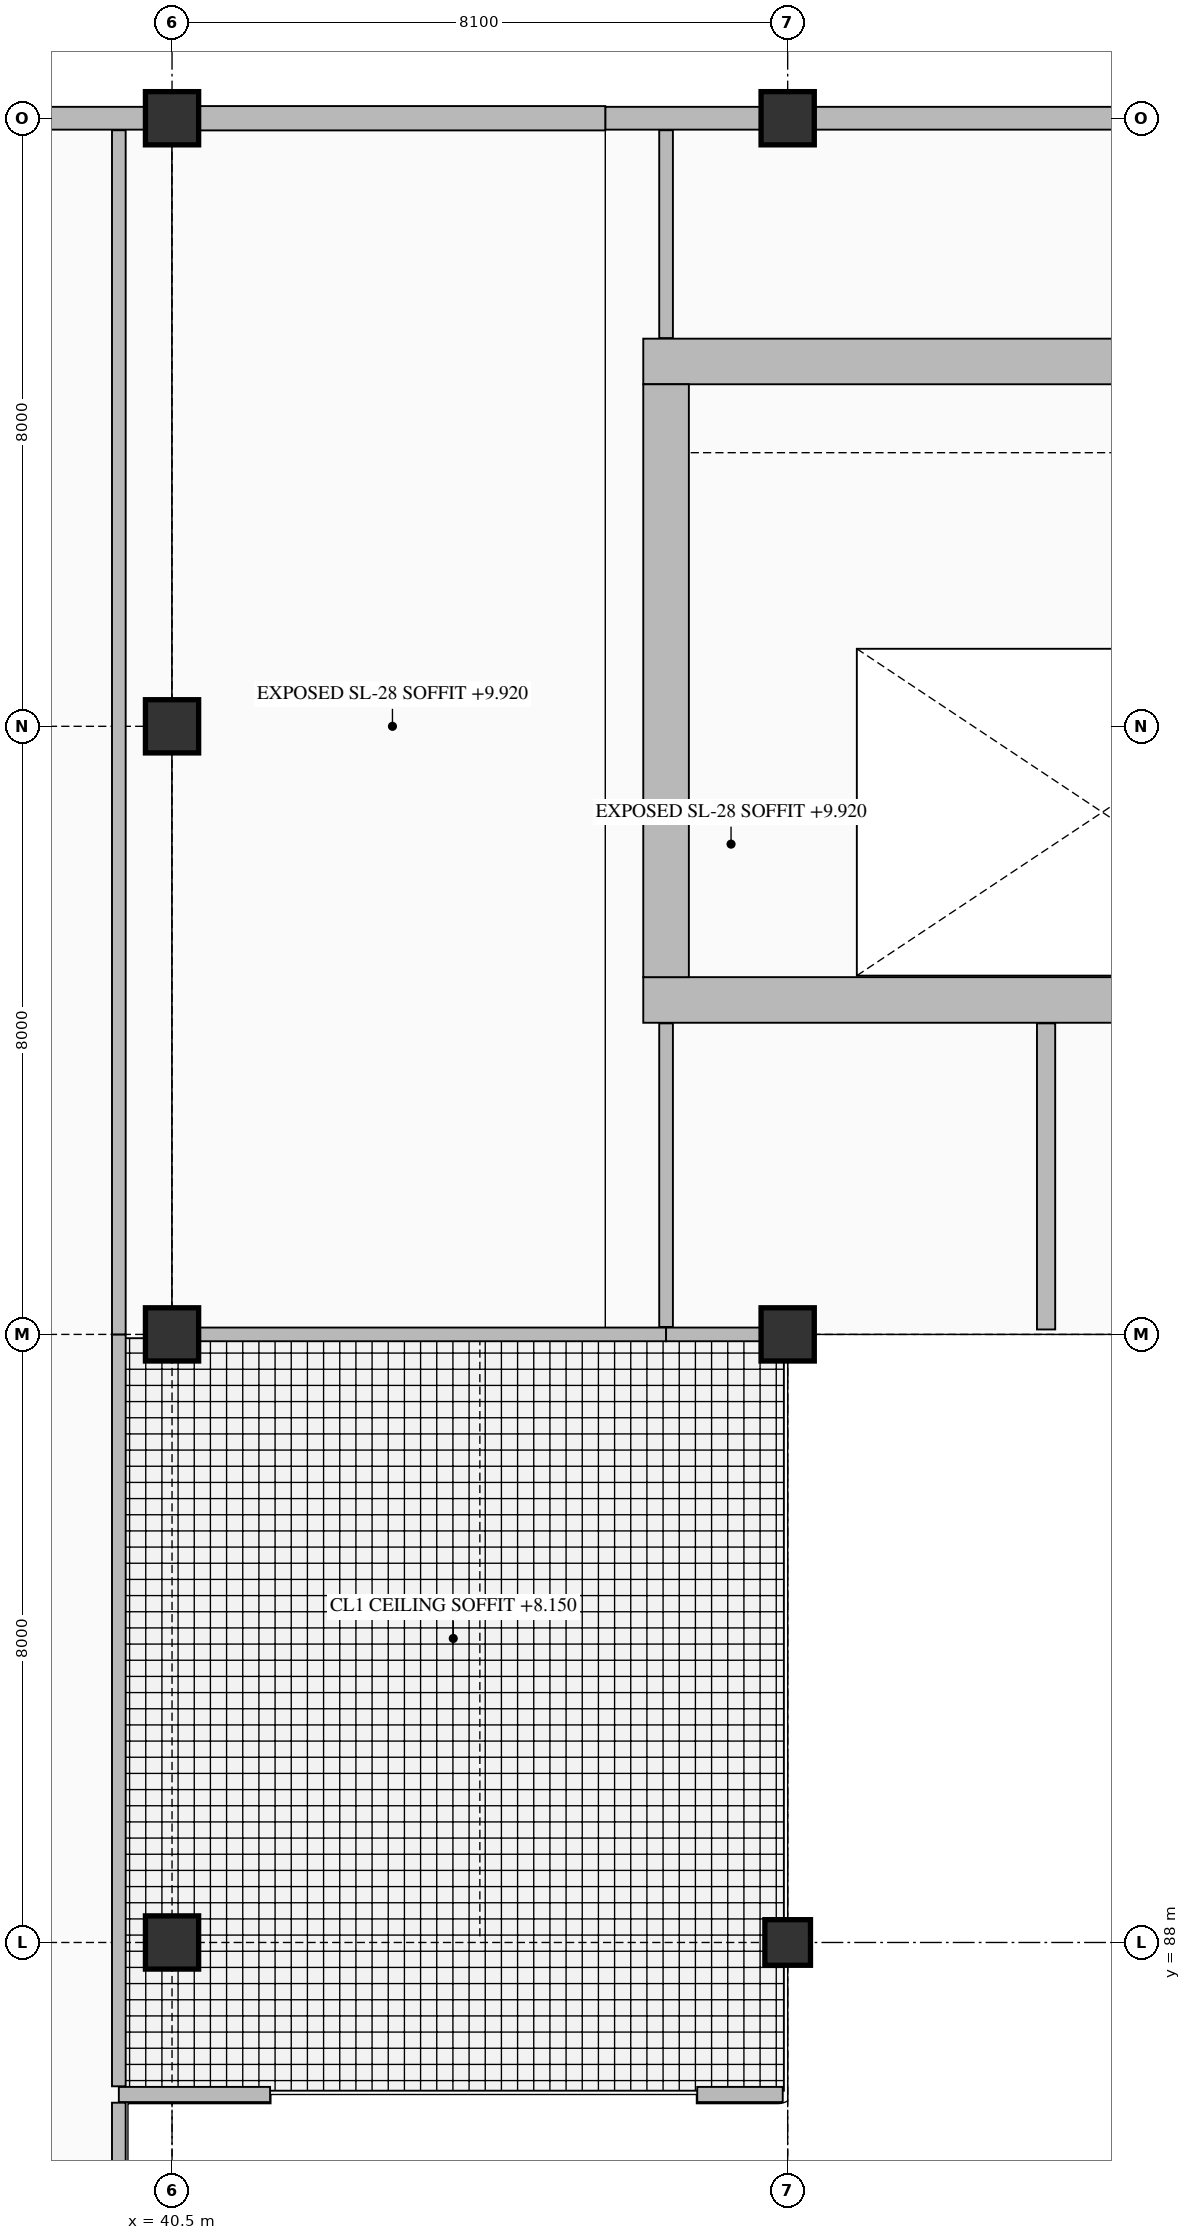
"""IFC4 building model, lengths in metres.
Left out: names, types, materials, properties, quantities, classifications, styles, units other than length and angle.
Written with IfcOpenShell. Run it as: python <this file> out.ifc"""

import sys

from ifc_helpers import new_model, si_unit, direction, frame, frame_2d, origin, origin_2d, place, context, subcontext, project, spatial, rectangle, extrude, element, fill, save


model = new_model("IFC4")
c1 = context("Model", 3, precision=1e-05, world=origin(), true_north=direction((0.0, 1.0)))
c2 = subcontext(c1, "Body", "Model", "MODEL_VIEW")
j1 = project(units=[si_unit("LENGTHUNIT", "METRE"), si_unit("PLANEANGLEUNIT", "RADIAN")], contexts=[c1])
p1 = place(None, origin())
s1 = spatial("IfcSite", under=j1, at=p1, CompositionType="ELEMENT")
p2 = place(p1, origin())
s2 = spatial("IfcBuilding", under=s1, at=p2, CompositionType="ELEMENT")
p3 = place(p2, frame((0.0, 0.0, 5.4)))
s3 = spatial("IfcBuildingStorey", under=s2, at=p3, CompositionType="ELEMENT", Elevation=5.4)
p4 = place(p3, frame((46.7, 100.4, 0.0), z_axis=(0.0, 0.0, 1.0), x_axis=(1.0, 0.0, 0.0)))
e1 = element("IfcWall", 1, at=p4, inside=s3, PredefinedType="SHEAR", context=c2, shape_type="SweptSolid", body=[
    extrude(rectangle(XDim=15.4, YDim=0.6, at=frame_2d((7.7, 0.0))), origin(), (0.0, 0.0, 1.0), 4.8),
])
p5 = place(p4, frame((1.05, 0.0, 0.0)))
e2 = element("IfcOpeningElement", 2, at=p5, cuts=e1, PredefinedType="OPENING", context=c2, shape_type="SweptSolid", body=[
    extrude(rectangle(XDim=1.15, YDim=2.25, at=frame_2d((0.575, 1.125))), frame((0.0, 0.31, 0.0), z_axis=(0.0, -1.0, 0.0), x_axis=(1.0, 0.0, 0.0)), (0.0, 0.0, 1.0), 0.62),
])
p6 = place(p4, frame((10.333, 0.0, 0.0)))
e3 = element("IfcOpeningElement", 3, at=p6, cuts=e1, PredefinedType="OPENING", context=c2, shape_type="SweptSolid", body=[
    extrude(rectangle(XDim=1.1, YDim=2.2, at=frame_2d((0.55, 1.1))), frame((0.0, 0.31, 0.0), z_axis=(0.0, -1.0, 0.0), x_axis=(1.0, 0.0, 0.0)), (0.0, 0.0, 1.0), 0.62),
])
p7 = place(p4, frame((13.048, 0.0, 0.0)))
e4 = element("IfcOpeningElement", 4, at=p7, cuts=e1, PredefinedType="OPENING", context=c2, shape_type="SweptSolid", body=[
    extrude(rectangle(XDim=1.1, YDim=2.2, at=frame_2d((0.55, 1.1))), frame((0.0, 0.31, 0.0), z_axis=(0.0, -1.0, 0.0), x_axis=(1.0, 0.0, 0.0)), (0.0, 0.0, 1.0), 0.62),
])
p8 = place(p3, frame((46.7, 108.8, 0.0), z_axis=(0.0, 0.0, 1.0), x_axis=(1.0, 0.0, 0.0)))
e5 = element("IfcWall", 5, at=p8, inside=s3, PredefinedType="SHEAR", context=c2, shape_type="SweptSolid", body=[
    extrude(rectangle(XDim=15.4, YDim=0.6, at=frame_2d((7.7, 0.0))), origin(), (0.0, 0.0, 1.0), 4.8),
])
p9 = place(p3, frame((47.0, 100.7, 0.0), z_axis=(0.0, 0.0, 1.0), x_axis=(0.0, 1.0, 0.0)))
e6 = element("IfcWall", 6, at=p9, inside=s3, PredefinedType="SHEAR", context=c2, shape_type="SweptSolid", body=[
    extrude(rectangle(XDim=7.8, YDim=0.6, at=frame_2d((3.9, 0.0))), origin(), (0.0, 0.0, 1.0), 4.8),
])
for number, where, z_axis, x_axis in (
    (7, (40.5, 88.0, 0.0), (0.0, 0.0, 1.0), (1.0, 0.0, 0.0)),
    (8, (40.5, 96.0, 0.0), (0.0, 0.0, 1.0), (1.0, 0.0, 0.0)),
    (9, (40.5, 104.0, 0.0), (0.0, 0.0, 1.0), (1.0, 0.0, 0.0)),
    (10, (40.5, 112.0, 0.0), (0.0, 0.0, 1.0), (1.0, 0.0, 0.0)),
):
    element("IfcColumn", number, at=place(p3, frame(where, z_axis=z_axis, x_axis=x_axis)), inside=s3, PredefinedType="COLUMN", context=c2, shape_type="SweptSolid", body=[
        extrude(rectangle(XDim=0.7, YDim=0.7, at=origin_2d()), origin(), (0.0, 0.0, 1.0), 4.8),
    ])
p10 = place(p3, frame((48.6, 88.0, 0.0), z_axis=(0.0, 0.0, 1.0), x_axis=(1.0, 0.0, 0.0)))
e11 = element("IfcColumn", 11, at=p10, inside=s3, PredefinedType="COLUMN", context=c2, shape_type="SweptSolid", body=[
    extrude(rectangle(XDim=0.6, YDim=0.6, at=origin_2d()), origin(), (0.0, 0.0, 1.0), 4.8),
])
for number, where, z_axis, x_axis in (
    (12, (48.6, 96.0, 0.0), (0.0, 0.0, 1.0), (1.0, 0.0, 0.0)),
    (13, (48.6, 112.0, 0.0), (0.0, 0.0, 1.0), (1.0, 0.0, 0.0)),
):
    element("IfcColumn", number, at=place(p3, frame(where, z_axis=z_axis, x_axis=x_axis)), inside=s3, PredefinedType="COLUMN", context=c2, shape_type="SweptSolid", body=[
        extrude(rectangle(XDim=0.7, YDim=0.7, at=origin_2d()), origin(), (0.0, 0.0, 1.0), 4.8),
    ])
p11 = place(p3, frame((62.775, 112.0, 0.0), z_axis=(0.0, 0.0, 1.0), x_axis=(-1.0, 0.0, 0.0)))
e14 = element("IfcWall", 14, at=p11, inside=s3, PredefinedType="SOLIDWALL", context=c2, shape_type="SweptSolid", body=[
    extrude(rectangle(XDim=14.175, YDim=0.3, at=frame_2d((7.087, 0.0))), origin(), (0.0, 0.0, 1.0), 3.812),
])
p12 = place(p11, frame((8.55, 0.0, 0.95)))
e15 = element("IfcOpeningElement", 15, at=p12, cuts=e14, PredefinedType="OPENING", context=c2, shape_type="SweptSolid", body=[
    extrude(rectangle(XDim=1.6, YDim=1.4, at=frame_2d((0.8, 0.7))), frame((0.0, 0.16, 0.0), z_axis=(0.0, -1.0, 0.0), x_axis=(1.0, 0.0, 0.0)), (0.0, 0.0, 1.0), 0.32),
])
p13 = place(p3, frame((48.6, 112.0, 0.0), z_axis=(0.0, 0.0, 1.0), x_axis=(-1.0, 0.0, 0.0)))
e16 = element("IfcWall", 16, at=p13, inside=s3, PredefinedType="SOLIDWALL", context=c2, shape_type="SweptSolid", body=[
    extrude(rectangle(XDim=2.4, YDim=0.3, at=frame_2d((1.2, 0.0))), origin(), (0.0, 0.0, 1.0), 3.812),
])
p14 = place(p3, frame((46.2, 112.0, 0.0), z_axis=(0.0, 0.0, 1.0), x_axis=(-1.0, 0.0, 0.0)))
e17 = element("IfcWall", 17, at=p14, inside=s3, PredefinedType="SOLIDWALL", context=c2, shape_type="SweptSolid", body=[
    extrude(rectangle(XDim=5.7, YDim=0.32, at=frame_2d((2.85, 0.0))), origin(), (0.0, 0.0, 1.0), 3.812),
])
p15 = place(p14, frame((2.25, 0.0, 0.95)))
e18 = element("IfcOpeningElement", 18, at=p15, cuts=e17, PredefinedType="OPENING", context=c2, shape_type="SweptSolid", body=[
    extrude(rectangle(XDim=0.9, YDim=1.8, at=frame_2d((0.45, 0.9))), frame((0.0, 0.17, 0.0), z_axis=(0.0, -1.0, 0.0), x_axis=(1.0, 0.0, 0.0)), (0.0, 0.0, 1.0), 0.34),
])
p16 = place(p3, frame((40.5, 112.0, 0.0), z_axis=(0.0, 0.0, 1.0), x_axis=(-1.0, 0.0, 0.0)))
e19 = element("IfcWall", 19, at=p16, inside=s3, PredefinedType="SOLIDWALL", context=c2, shape_type="SweptSolid", body=[
    extrude(rectangle(XDim=12.15, YDim=0.3, at=frame_2d((6.075, 0.0))), origin(), (0.0, 0.0, 1.0), 3.812),
])
p17 = place(p16, frame((5.4, 0.0, 0.85)))
e20 = element("IfcOpeningElement", 20, at=p17, cuts=e19, PredefinedType="OPENING", context=c2, shape_type="SweptSolid", body=[
    extrude(rectangle(XDim=0.9, YDim=2.1, at=frame_2d((0.45, 1.05))), frame((0.0, 0.16, 0.0), z_axis=(0.0, -1.0, 0.0), x_axis=(1.0, 0.0, 0.0)), (0.0, 0.0, 1.0), 0.32),
])
p18 = place(p3, frame((39.8, 86.0, 0.0), z_axis=(0.0, 0.0, 1.0), x_axis=(1.0, 0.0, 0.0)))
e21 = element("IfcWall", 21, at=p18, inside=s3, PredefinedType="PARTITIONING", context=c2, shape_type="SweptSolid", body=[
    extrude(rectangle(XDim=1.99, YDim=0.2, at=frame_2d((0.995, 0.0))), origin(), (0.0, 0.0, 1.0), 4.52),
])
p19 = place(p3, frame((47.41, 86.0, 0.0), z_axis=(0.0, 0.0, 1.0), x_axis=(1.0, 0.0, 0.0)))
e22 = element("IfcWall", 22, at=p19, inside=s3, PredefinedType="PARTITIONING", context=c2, shape_type="SweptSolid", body=[
    extrude(rectangle(XDim=1.125, YDim=0.2, at=frame_2d((0.562, 0.0))), origin(), (0.0, 0.0, 1.0), 4.52),
])
p20 = place(p3, frame((40.858, 96.0, 0.0), z_axis=(0.0, 0.0, 1.0), x_axis=(1.0, 0.0, 0.0)))
e23 = element("IfcWall", 23, at=p20, inside=s3, PredefinedType="PARTITIONING", context=c2, shape_type="SweptSolid", body=[
    extrude(rectangle(XDim=6.142, YDim=0.18, at=frame_2d((3.071, 0.0))), origin(), (0.0, 0.0, 1.0), 3.862),
])
p21 = place(p3, frame((47.0, 96.0, 0.0), z_axis=(0.0, 0.0, 1.0), x_axis=(1.0, 0.0, 0.0)))
e24 = element("IfcWall", 24, at=p21, inside=s3, PredefinedType="PARTITIONING", context=c2, shape_type="SweptSolid", body=[
    extrude(rectangle(XDim=1.242, YDim=0.18, at=frame_2d((0.621, 0.0))), origin(), (0.0, 0.0, 1.0), 3.862),
])
p22 = place(p3, frame((39.8, 78.735, 0.0), z_axis=(0.0, 0.0, 1.0), x_axis=(0.0, 1.0, 0.0)))
e25 = element("IfcWall", 25, at=p22, inside=s3, PredefinedType="PARTITIONING", context=c2, shape_type="SweptSolid", body=[
    extrude(rectangle(XDim=7.157, YDim=0.18, at=frame_2d((3.579, 0.0))), origin(), (0.0, 0.0, 1.0), 4.52),
])
p23 = place(p3, frame((39.8, 86.108, 0.0), z_axis=(0.0, 0.0, 1.0), x_axis=(0.0, 1.0, 0.0)))
e26 = element("IfcWall", 26, at=p23, inside=s3, PredefinedType="PARTITIONING", context=c2, shape_type="SweptSolid", body=[
    extrude(rectangle(XDim=9.892, YDim=0.18, at=frame_2d((4.946, 0.0))), origin(), (0.0, 0.0, 1.0), 4.52),
])
p24 = place(p23, frame((4.396, 0.0, 0.0)))
e27 = element("IfcOpeningElement", 27, at=p24, cuts=e26, PredefinedType="OPENING", context=c2, shape_type="SweptSolid", body=[
    extrude(rectangle(XDim=1.1, YDim=2.2, at=frame_2d((0.55, 1.1))), frame((0.0, 0.1, 0.0), z_axis=(0.0, -1.0, 0.0), x_axis=(1.0, 0.0, 0.0)), (0.0, 0.0, 1.0), 0.2),
])
p25 = place(p3, frame((39.8, 96.0, 0.0), z_axis=(0.0, 0.0, 1.0), x_axis=(0.0, 1.0, 0.0)))
e28 = element("IfcWall", 28, at=p25, inside=s3, PredefinedType="PARTITIONING", context=c2, shape_type="SweptSolid", body=[
    extrude(rectangle(XDim=15.842, YDim=0.18, at=frame_2d((7.921, 0.0))), origin(), (0.0, 0.0, 1.0), 4.52),
])
p26 = place(p25, frame((4.786, 0.0, 0.0)))
e29 = element("IfcOpeningElement", 29, at=p26, cuts=e28, PredefinedType="OPENING", context=c2, shape_type="SweptSolid", body=[
    extrude(rectangle(XDim=1.2, YDim=2.2, at=frame_2d((0.6, 1.1))), frame((0.0, 0.1, 0.0), z_axis=(0.0, -1.0, 0.0), x_axis=(1.0, 0.0, 0.0)), (0.0, 0.0, 1.0), 0.2),
])
p27 = place(p3, frame((47.0, 96.098, 0.0), z_axis=(0.0, 0.0, 1.0), x_axis=(0.0, 1.0, 0.0)))
e30 = element("IfcWall", 30, at=p27, inside=s3, PredefinedType="PARTITIONING", context=c2, shape_type="SweptSolid", body=[
    extrude(rectangle(XDim=3.994, YDim=0.18, at=frame_2d((1.997, 0.0))), origin(), (0.0, 0.0, 1.0), 4.52),
])
p28 = place(p27, frame((1.447, 0.0, 0.0)))
e31 = element("IfcOpeningElement", 31, at=p28, cuts=e30, PredefinedType="OPENING", context=c2, shape_type="SweptSolid", body=[
    extrude(rectangle(XDim=1.1, YDim=2.2, at=frame_2d((0.55, 1.1))), frame((0.0, 0.1, 0.0), z_axis=(0.0, -1.0, 0.0), x_axis=(1.0, 0.0, 0.0)), (0.0, 0.0, 1.0), 0.2),
])
p29 = place(p3, frame((47.0, 109.108, 0.0), z_axis=(0.0, 0.0, 1.0), x_axis=(0.0, 1.0, 0.0)))
e32 = element("IfcWall", 32, at=p29, inside=s3, PredefinedType="PARTITIONING", context=c2, shape_type="SweptSolid", body=[
    extrude(rectangle(XDim=2.734, YDim=0.18, at=frame_2d((1.367, 0.0))), origin(), (0.0, 0.0, 1.0), 4.52),
])
p30 = place(p29, frame((0.598, 0.0, 0.0)))
e33 = element("IfcOpeningElement", 33, at=p30, cuts=e32, PredefinedType="OPENING", context=c2, shape_type="SweptSolid", body=[
    extrude(rectangle(XDim=1.1, YDim=2.2, at=frame_2d((0.55, 1.1))), frame((0.0, 0.1, 0.0), z_axis=(0.0, -1.0, 0.0), x_axis=(1.0, 0.0, 0.0)), (0.0, 0.0, 1.0), 0.2),
])
p31 = place(p3, frame((52.0, 96.065, 0.0), z_axis=(0.0, 0.0, 1.0), x_axis=(0.0, 1.0, 0.0)))
e34 = element("IfcWall", 34, at=p31, inside=s3, PredefinedType="PARTITIONING", context=c2, shape_type="SweptSolid", body=[
    extrude(rectangle(XDim=4.027, YDim=0.24, at=frame_2d((2.014, 0.0))), origin(), (0.0, 0.0, 1.0), 4.52),
])
p32 = place(p31, frame((1.414, 0.0, 0.0)))
e35 = element("IfcOpeningElement", 35, at=p32, cuts=e34, PredefinedType="OPENING", context=c2, shape_type="SweptSolid", body=[
    extrude(rectangle(XDim=1.2, YDim=2.3, at=frame_2d((0.6, 1.15))), frame((0.0, 0.13, 0.0), z_axis=(0.0, -1.0, 0.0), x_axis=(1.0, 0.0, 0.0)), (0.0, 0.0, 1.0), 0.26),
])
p33 = place(p12, origin())
e36 = element("IfcWindow", 36, at=p33, inside=s3, PartitioningType="SINGLE_PANEL", PredefinedType="WINDOW", context=c2, shape_type="SweptSolid", body=[
    extrude(rectangle(XDim=1.6, YDim=1.4, at=frame_2d((0.8, 0.7))), frame((0.0, 0.03, 0.0), z_axis=(0.0, -1.0, 0.0), x_axis=(1.0, 0.0, 0.0)), (0.0, 0.0, 1.0), 0.06),
])
fill(e15, e36)
p34 = place(p15, origin())
e37 = element("IfcWindow", 37, at=p34, inside=s3, PartitioningType="SINGLE_PANEL", PredefinedType="WINDOW", context=c2, shape_type="SweptSolid", body=[
    extrude(rectangle(XDim=0.9, YDim=1.8, at=frame_2d((0.45, 0.9))), frame((0.0, 0.03, 0.0), z_axis=(0.0, -1.0, 0.0), x_axis=(1.0, 0.0, 0.0)), (0.0, 0.0, 1.0), 0.06),
])
fill(e18, e37)
p35 = place(p5, origin())
e38 = element("IfcDoor", 38, at=p35, inside=s3, OperationType="SINGLE_SWING_LEFT", PredefinedType="DOOR", context=c2, shape_type="SweptSolid", body=[
    extrude(rectangle(XDim=1.15, YDim=2.25, at=frame_2d((0.575, 1.125))), frame((0.0, 0.025, 0.0), z_axis=(0.0, -1.0, 0.0), x_axis=(1.0, 0.0, 0.0)), (0.0, 0.0, 1.0), 0.05),
])
fill(e2, e38)
p36 = place(p24, frame((1.1, 0.0, 0.0), z_axis=(0.0, 0.0, 1.0), x_axis=(-1.0, 0.0, 0.0)))
e39 = element("IfcDoor", 39, at=p36, inside=s3, OperationType="SINGLE_SWING_LEFT", PredefinedType="DOOR", context=c2, shape_type="SweptSolid", body=[
    extrude(rectangle(XDim=1.1, YDim=2.2, at=frame_2d((0.55, 1.1))), frame((0.0, 0.025, 0.0), z_axis=(0.0, -1.0, 0.0), x_axis=(1.0, 0.0, 0.0)), (0.0, 0.0, 1.0), 0.05),
])
fill(e27, e39)
p37 = place(p26, frame((1.2, 0.0, 0.0), z_axis=(0.0, 0.0, 1.0), x_axis=(-1.0, 0.0, 0.0)))
e40 = element("IfcDoor", 40, at=p37, inside=s3, OperationType="SINGLE_SWING_RIGHT", PredefinedType="DOOR", context=c2, shape_type="SweptSolid", body=[
    extrude(rectangle(XDim=1.2, YDim=2.2, at=frame_2d((0.6, 1.1))), frame((0.0, 0.025, 0.0), z_axis=(0.0, -1.0, 0.0), x_axis=(1.0, 0.0, 0.0)), (0.0, 0.0, 1.0), 0.05),
])
fill(e29, e40)
p38 = place(p28, origin())
e41 = element("IfcDoor", 41, at=p38, inside=s3, OperationType="SINGLE_SWING_LEFT", PredefinedType="DOOR", context=c2, shape_type="SweptSolid", body=[
    extrude(rectangle(XDim=1.1, YDim=2.2, at=frame_2d((0.55, 1.1))), frame((0.0, 0.025, 0.0), z_axis=(0.0, -1.0, 0.0), x_axis=(1.0, 0.0, 0.0)), (0.0, 0.0, 1.0), 0.05),
])
fill(e31, e41)
p39 = place(p30, frame((1.1, 0.0, 0.0), z_axis=(0.0, 0.0, 1.0), x_axis=(-1.0, 0.0, 0.0)))
e42 = element("IfcDoor", 42, at=p39, inside=s3, OperationType="SINGLE_SWING_RIGHT", PredefinedType="DOOR", context=c2, shape_type="SweptSolid", body=[
    extrude(rectangle(XDim=1.1, YDim=2.2, at=frame_2d((0.55, 1.1))), frame((0.0, 0.025, 0.0), z_axis=(0.0, -1.0, 0.0), x_axis=(1.0, 0.0, 0.0)), (0.0, 0.0, 1.0), 0.05),
])
fill(e33, e42)
p40 = place(p32, origin())
e43 = element("IfcDoor", 43, at=p40, inside=s3, OperationType="SINGLE_SWING_LEFT", PredefinedType="DOOR", context=c2, shape_type="SweptSolid", body=[
    extrude(rectangle(XDim=1.2, YDim=2.3, at=frame_2d((0.6, 1.15))), frame((0.0, 0.025, 0.0), z_axis=(0.0, -1.0, 0.0), x_axis=(1.0, 0.0, 0.0)), (0.0, 0.0, 1.0), 0.05),
])
fill(e35, e43)
save(model, sys.argv[1])
